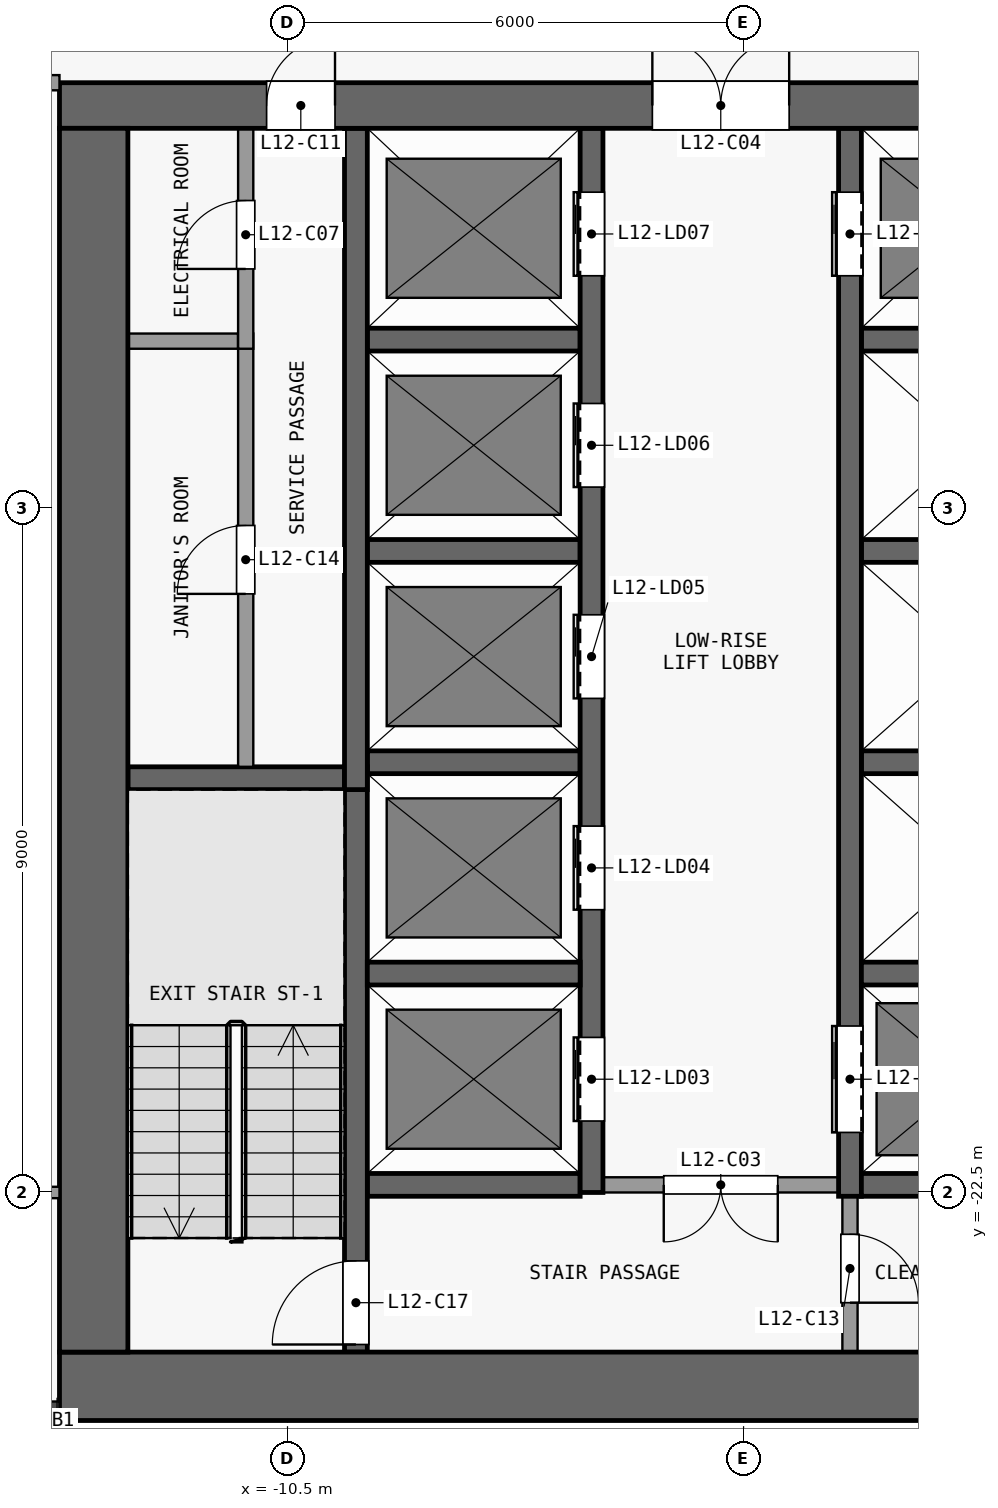
"""IFC4 building model, lengths in metres.
Left out: names, types, materials, properties, quantities, classifications, styles, units other than length and angle.
Written with IfcOpenShell. Run it as: python <this file> out.ifc"""

import sys

from ifc_helpers import new_model, si_unit, direction, frame, frame_2d, origin, place, context, subcontext, project, spatial, rectangle, extrude, element, fill, save


model = new_model("IFC4")
c1 = context("Model", 3, precision=1e-05, world=origin(), true_north=direction((0.0, 1.0)))
c2 = subcontext(c1, "Body", "Model", "MODEL_VIEW")
j1 = project(units=[si_unit("LENGTHUNIT", "METRE"), si_unit("PLANEANGLEUNIT", "RADIAN")], contexts=[c1])
p1 = place(None, origin())
s1 = spatial("IfcSite", under=j1, at=p1, CompositionType="ELEMENT")
p2 = place(p1, origin())
s2 = spatial("IfcBuilding", under=s1, at=p2, CompositionType="ELEMENT")
p3 = place(p2, frame((0.0, 0.0, 54.1)))
s3 = spatial("IfcBuildingStorey", under=s2, at=p3, CompositionType="ELEMENT", Elevation=54.1)
p4 = place(p3, frame((-13.5, -25.05, 0.0), z_axis=(0.0, 0.0, 1.0), x_axis=(1.0, 0.0, 0.0)))
e1 = element("IfcWall", 1, at=p4, inside=s3, PredefinedType="SHEAR", context=c2, shape_type="SweptSolid", body=[
    extrude(rectangle(XDim=27.0, YDim=0.9, at=frame_2d((13.5, 0.0))), origin(), (0.0, 0.0, 1.0), 3.3),
])
p5 = place(p3, frame((-13.5, -8.2, 0.0), z_axis=(0.0, 0.0, 1.0), x_axis=(1.0, 0.0, 0.0)))
e2 = element("IfcWall", 2, at=p5, inside=s3, PredefinedType="SHEAR", context=c2, shape_type="SweptSolid", body=[
    extrude(rectangle(XDim=27.0, YDim=0.6, at=frame_2d((13.5, 0.0))), origin(), (0.0, 0.0, 1.0), 3.3),
])
p6 = place(p5, frame((7.8, 0.0, 0.0)))
e3 = element("IfcOpeningElement", 3, at=p6, cuts=e2, PredefinedType="OPENING", context=c2, shape_type="SweptSolid", body=[
    extrude(rectangle(XDim=1.8, YDim=2.1, at=frame_2d((0.9, 1.05))), frame((0.0, 0.31, 0.0), z_axis=(0.0, -1.0, 0.0), x_axis=(1.0, 0.0, 0.0)), (0.0, 0.0, 1.0), 0.62),
])
p7 = place(p5, frame((17.4, 0.0, 0.0)))
e4 = element("IfcOpeningElement", 4, at=p7, cuts=e2, PredefinedType="OPENING", context=c2, shape_type="SweptSolid", body=[
    extrude(rectangle(XDim=1.8, YDim=2.1, at=frame_2d((0.9, 1.05))), frame((0.0, 0.31, 0.0), z_axis=(0.0, -1.0, 0.0), x_axis=(1.0, 0.0, 0.0)), (0.0, 0.0, 1.0), 0.62),
])
p8 = place(p5, frame((2.725, 0.0, 0.0)))
e5 = element("IfcOpeningElement", 5, at=p8, cuts=e2, PredefinedType="OPENING", context=c2, shape_type="SweptSolid", body=[
    extrude(rectangle(XDim=0.9, YDim=2.1, at=frame_2d((0.45, 1.05))), frame((0.0, 0.31, 0.0), z_axis=(0.0, -1.0, 0.0), x_axis=(1.0, 0.0, 0.0)), (0.0, 0.0, 1.0), 0.62),
])
p9 = place(p5, frame((23.375, 0.0, 0.0)))
e6 = element("IfcOpeningElement", 6, at=p9, cuts=e2, PredefinedType="OPENING", context=c2, shape_type="SweptSolid", body=[
    extrude(rectangle(XDim=0.9, YDim=2.1, at=frame_2d((0.45, 1.05))), frame((0.0, 0.31, 0.0), z_axis=(0.0, -1.0, 0.0), x_axis=(1.0, 0.0, 0.0)), (0.0, 0.0, 1.0), 0.62),
])
p10 = place(p3, frame((-13.05, -24.6, 0.0), z_axis=(0.0, 0.0, 1.0), x_axis=(0.0, 1.0, 0.0)))
e7 = element("IfcWall", 7, at=p10, inside=s3, PredefinedType="SHEAR", context=c2, shape_type="SweptSolid", body=[
    extrude(rectangle(XDim=16.1, YDim=0.9, at=frame_2d((8.05, 0.0))), origin(), (0.0, 0.0, 1.0), 3.3),
])
p11 = place(p3, frame((-9.45, -22.4, 0.0), z_axis=(0.0, 0.0, 1.0), x_axis=(1.0, 0.0, 0.0)))
e8 = element("IfcWall", 8, at=p11, inside=s3, PredefinedType="SHEAR", context=c2, shape_type="SweptSolid", body=[
    extrude(rectangle(XDim=2.8, YDim=0.3, at=frame_2d((1.4, 0.0))), origin(), (0.0, 0.0, 1.0), 3.3),
])
p12 = place(p3, frame((-3.25, -22.4, 0.0), z_axis=(0.0, 0.0, 1.0), x_axis=(-1.0, 0.0, 0.0)))
e9 = element("IfcWall", 9, at=p12, inside=s3, PredefinedType="PARTITIONING", context=c2, shape_type="SweptSolid", body=[
    extrude(rectangle(XDim=3.1, YDim=0.2, at=frame_2d((1.55, 0.0))), origin(), (0.0, 0.0, 1.0), 3.3),
])
p13 = place(p12, frame((0.8, 0.0, 0.0)))
e10 = element("IfcOpeningElement", 10, at=p13, cuts=e9, PredefinedType="OPENING", context=c2, shape_type="SweptSolid", body=[
    extrude(rectangle(XDim=1.5, YDim=2.1, at=frame_2d((0.75, 1.05))), frame((0.0, 0.11, 0.0), z_axis=(0.0, -1.0, 0.0), x_axis=(1.0, 0.0, 0.0)), (0.0, 0.0, 1.0), 0.22),
])
p14 = place(p3, frame((-2.95, -22.4, 0.0), z_axis=(0.0, 0.0, 1.0), x_axis=(1.0, 0.0, 0.0)))
e11 = element("IfcWall", 11, at=p14, inside=s3, PredefinedType="SHEAR", context=c2, shape_type="SweptSolid", body=[
    extrude(rectangle(XDim=6.2, YDim=0.3, at=frame_2d((3.1, 0.0))), origin(), (0.0, 0.0, 1.0), 3.3),
])
for number, where, z_axis, x_axis in (
    (12, (-9.45, -19.62, 0.0), (0.0, 0.0, 1.0), (1.0, 0.0, 0.0)),
    (13, (-2.95, -19.62, 0.0), (0.0, 0.0, 1.0), (1.0, 0.0, 0.0)),
):
    element("IfcWall", number, at=place(p3, frame(where, z_axis=z_axis, x_axis=x_axis)), inside=s3, PredefinedType="SHEAR", context=c2, shape_type="SweptSolid", body=[
        extrude(rectangle(XDim=2.8, YDim=0.3, at=frame_2d((1.4, 0.0))), origin(), (0.0, 0.0, 1.0), 3.3),
    ])
p15 = place(p3, frame((-12.6, -17.05, 0.0), z_axis=(0.0, 0.0, 1.0), x_axis=(1.0, 0.0, 0.0)))
e14 = element("IfcWall", 14, at=p15, inside=s3, PredefinedType="SHEAR", context=c2, shape_type="SweptSolid", body=[
    extrude(rectangle(XDim=2.85, YDim=0.3, at=frame_2d((1.425, 0.0))), origin(), (0.0, 0.0, 1.0), 3.3),
])
for number, where, z_axis, x_axis in (
    (15, (-9.45, -16.84, 0.0), (0.0, 0.0, 1.0), (1.0, 0.0, 0.0)),
    (16, (-2.95, -16.84, 0.0), (0.0, 0.0, 1.0), (1.0, 0.0, 0.0)),
    (17, (-9.45, -14.06, 0.0), (0.0, 0.0, 1.0), (1.0, 0.0, 0.0)),
    (18, (-2.95, -14.06, 0.0), (0.0, 0.0, 1.0), (1.0, 0.0, 0.0)),
):
    element("IfcWall", number, at=place(p3, frame(where, z_axis=z_axis, x_axis=x_axis)), inside=s3, PredefinedType="SHEAR", context=c2, shape_type="SweptSolid", body=[
        extrude(rectangle(XDim=2.8, YDim=0.3, at=frame_2d((1.4, 0.0))), origin(), (0.0, 0.0, 1.0), 3.3),
    ])
p16 = place(p3, frame((-12.6, -11.3, 0.0), z_axis=(0.0, 0.0, 1.0), x_axis=(1.0, 0.0, 0.0)))
e19 = element("IfcWall", 19, at=p16, inside=s3, PredefinedType="PARTITIONING", context=c2, shape_type="SweptSolid", body=[
    extrude(rectangle(XDim=1.45, YDim=0.2, at=frame_2d((0.725, 0.0))), origin(), (0.0, 0.0, 1.0), 3.3),
])
for number, where, z_axis, x_axis in (
    (20, (-9.45, -11.28, 0.0), (0.0, 0.0, 1.0), (1.0, 0.0, 0.0)),
    (21, (-2.95, -11.28, 0.0), (0.0, 0.0, 1.0), (1.0, 0.0, 0.0)),
):
    element("IfcWall", number, at=place(p3, frame(where, z_axis=z_axis, x_axis=x_axis)), inside=s3, PredefinedType="SHEAR", context=c2, shape_type="SweptSolid", body=[
        extrude(rectangle(XDim=2.8, YDim=0.3, at=frame_2d((1.4, 0.0))), origin(), (0.0, 0.0, 1.0), 3.3),
    ])
p17 = place(p3, frame((-11.05, -16.9, 0.0), z_axis=(0.0, 0.0, 1.0), x_axis=(0.0, 1.0, 0.0)))
e22 = element("IfcWall", 22, at=p17, inside=s3, PredefinedType="PARTITIONING", context=c2, shape_type="SweptSolid", body=[
    extrude(rectangle(XDim=5.7, YDim=0.2, at=frame_2d((2.85, 0.0))), origin(), (0.0, 0.0, 1.0), 3.3),
])
p18 = place(p17, frame((2.275, 0.0, 0.0)))
e23 = element("IfcOpeningElement", 23, at=p18, cuts=e22, PredefinedType="OPENING", context=c2, shape_type="SweptSolid", body=[
    extrude(rectangle(XDim=0.9, YDim=2.1, at=frame_2d((0.45, 1.05))), frame((0.0, 0.11, 0.0), z_axis=(0.0, -1.0, 0.0), x_axis=(1.0, 0.0, 0.0)), (0.0, 0.0, 1.0), 0.22),
])
p19 = place(p3, frame((-11.05, -11.4, 0.0), z_axis=(0.0, 0.0, 1.0), x_axis=(0.0, 1.0, 0.0)))
e24 = element("IfcWall", 24, at=p19, inside=s3, PredefinedType="PARTITIONING", context=c2, shape_type="SweptSolid", body=[
    extrude(rectangle(XDim=2.9, YDim=0.2, at=frame_2d((1.45, 0.0))), origin(), (0.0, 0.0, 1.0), 3.3),
])
p20 = place(p19, frame((1.05, 0.0, 0.0)))
e25 = element("IfcOpeningElement", 25, at=p20, cuts=e24, PredefinedType="OPENING", context=c2, shape_type="SweptSolid", body=[
    extrude(rectangle(XDim=0.9, YDim=2.1, at=frame_2d((0.45, 1.05))), frame((0.0, 0.11, 0.0), z_axis=(0.0, -1.0, 0.0), x_axis=(1.0, 0.0, 0.0)), (0.0, 0.0, 1.0), 0.22),
])
p21 = place(p3, frame((-9.6, -24.6, 0.0), z_axis=(0.0, 0.0, 1.0), x_axis=(0.0, 1.0, 0.0)))
e26 = element("IfcWall", 26, at=p21, inside=s3, PredefinedType="SHEAR", context=c2, shape_type="SweptSolid", body=[
    extrude(rectangle(XDim=7.7, YDim=0.3, at=frame_2d((3.85, 0.0))), origin(), (0.0, 0.0, 1.0), 3.3),
])
p22 = place(p21, frame((0.1, 0.0, 0.0)))
e27 = element("IfcOpeningElement", 27, at=p22, cuts=e26, PredefinedType="OPENING", context=c2, shape_type="SweptSolid", body=[
    extrude(rectangle(XDim=1.1, YDim=2.1, at=frame_2d((0.55, 1.05))), frame((0.0, 0.16, 0.0), z_axis=(0.0, -1.0, 0.0), x_axis=(1.0, 0.0, 0.0)), (0.0, 0.0, 1.0), 0.32),
])
p23 = place(p3, frame((-9.6, -17.2, 0.0), z_axis=(0.0, 0.0, 1.0), x_axis=(0.0, 1.0, 0.0)))
e28 = element("IfcWall", 28, at=p23, inside=s3, PredefinedType="SHEAR", context=c2, shape_type="SweptSolid", body=[
    extrude(rectangle(XDim=8.7, YDim=0.3, at=frame_2d((4.35, 0.0))), origin(), (0.0, 0.0, 1.0), 3.3),
])
p24 = place(p3, frame((-6.5, -22.5, 0.0), z_axis=(0.0, 0.0, 1.0), x_axis=(0.0, 1.0, 0.0)))
e29 = element("IfcWall", 29, at=p24, inside=s3, PredefinedType="SHEAR", context=c2, shape_type="SweptSolid", body=[
    extrude(rectangle(XDim=14.0, YDim=0.3, at=frame_2d((7.0, 0.0))), origin(), (0.0, 0.0, 1.0), 3.3),
])
p25 = place(p24, frame((0.94, 0.0, 0.0)))
e30 = element("IfcOpeningElement", 30, at=p25, cuts=e29, PredefinedType="OPENING", context=c2, shape_type="SweptSolid", body=[
    extrude(rectangle(XDim=1.1, YDim=2.1, at=frame_2d((0.55, 1.05))), frame((0.0, 0.16, 0.0), z_axis=(0.0, -1.0, 0.0), x_axis=(1.0, 0.0, 0.0)), (0.0, 0.0, 1.0), 0.32),
])
p26 = place(p24, frame((3.72, 0.0, 0.0)))
e31 = element("IfcOpeningElement", 31, at=p26, cuts=e29, PredefinedType="OPENING", context=c2, shape_type="SweptSolid", body=[
    extrude(rectangle(XDim=1.1, YDim=2.1, at=frame_2d((0.55, 1.05))), frame((0.0, 0.16, 0.0), z_axis=(0.0, -1.0, 0.0), x_axis=(1.0, 0.0, 0.0)), (0.0, 0.0, 1.0), 0.32),
])
p27 = place(p24, frame((6.5, 0.0, 0.0)))
e32 = element("IfcOpeningElement", 32, at=p27, cuts=e29, PredefinedType="OPENING", context=c2, shape_type="SweptSolid", body=[
    extrude(rectangle(XDim=1.1, YDim=2.1, at=frame_2d((0.55, 1.05))), frame((0.0, 0.16, 0.0), z_axis=(0.0, -1.0, 0.0), x_axis=(1.0, 0.0, 0.0)), (0.0, 0.0, 1.0), 0.32),
])
p28 = place(p24, frame((9.28, 0.0, 0.0)))
e33 = element("IfcOpeningElement", 33, at=p28, cuts=e29, PredefinedType="OPENING", context=c2, shape_type="SweptSolid", body=[
    extrude(rectangle(XDim=1.1, YDim=2.1, at=frame_2d((0.55, 1.05))), frame((0.0, 0.16, 0.0), z_axis=(0.0, -1.0, 0.0), x_axis=(1.0, 0.0, 0.0)), (0.0, 0.0, 1.0), 0.32),
])
p29 = place(p24, frame((12.06, 0.0, 0.0)))
e34 = element("IfcOpeningElement", 34, at=p29, cuts=e29, PredefinedType="OPENING", context=c2, shape_type="SweptSolid", body=[
    extrude(rectangle(XDim=1.1, YDim=2.1, at=frame_2d((0.55, 1.05))), frame((0.0, 0.16, 0.0), z_axis=(0.0, -1.0, 0.0), x_axis=(1.0, 0.0, 0.0)), (0.0, 0.0, 1.0), 0.32),
])
p30 = place(p3, frame((-3.1, -22.55, 0.0), z_axis=(0.0, 0.0, 1.0), x_axis=(0.0, -1.0, 0.0)))
e35 = element("IfcWall", 35, at=p30, inside=s3, PredefinedType="PARTITIONING", context=c2, shape_type="SweptSolid", body=[
    extrude(rectangle(XDim=2.05, YDim=0.2, at=frame_2d((1.025, 0.0))), origin(), (0.0, 0.0, 1.0), 3.3),
])
p31 = place(p30, frame((0.5, 0.0, 0.0)))
e36 = element("IfcOpeningElement", 36, at=p31, cuts=e35, PredefinedType="OPENING", context=c2, shape_type="SweptSolid", body=[
    extrude(rectangle(XDim=0.9, YDim=2.1, at=frame_2d((0.45, 1.05))), frame((0.0, 0.11, 0.0), z_axis=(0.0, -1.0, 0.0), x_axis=(1.0, 0.0, 0.0)), (0.0, 0.0, 1.0), 0.22),
])
p32 = place(p3, frame((-3.1, -22.55, 0.0), z_axis=(0.0, 0.0, 1.0), x_axis=(0.0, 1.0, 0.0)))
e37 = element("IfcWall", 37, at=p32, inside=s3, PredefinedType="SHEAR", context=c2, shape_type="SweptSolid", body=[
    extrude(rectangle(XDim=14.05, YDim=0.3, at=frame_2d((7.025, 0.0))), origin(), (0.0, 0.0, 1.0), 3.3),
])
p33 = place(p32, frame((12.11, 0.0, 0.0)))
e38 = element("IfcOpeningElement", 38, at=p33, cuts=e37, PredefinedType="OPENING", context=c2, shape_type="SweptSolid", body=[
    extrude(rectangle(XDim=1.1, YDim=2.1, at=frame_2d((0.55, 1.05))), frame((0.0, 0.16, 0.0), z_axis=(0.0, -1.0, 0.0), x_axis=(1.0, 0.0, 0.0)), (0.0, 0.0, 1.0), 0.32),
])
p34 = place(p32, frame((0.84, 0.0, 0.0)))
e39 = element("IfcOpeningElement", 39, at=p34, cuts=e37, PredefinedType="OPENING", context=c2, shape_type="SweptSolid", body=[
    extrude(rectangle(XDim=1.4, YDim=2.1, at=frame_2d((0.7, 1.05))), frame((0.0, 0.16, 0.0), z_axis=(0.0, -1.0, 0.0), x_axis=(1.0, 0.0, 0.0)), (0.0, 0.0, 1.0), 0.32),
])
p35 = place(p3, frame((-16.425, -22.5, 0.0), z_axis=(0.0, 0.0, 1.0), x_axis=(1.0, 0.0, 0.0)))
e40 = element("IfcWall", 40, at=p35, inside=s3, PredefinedType="PARTITIONING", context=c2, shape_type="SweptSolid", body=[
    extrude(rectangle(XDim=2.925, YDim=0.15, at=frame_2d((1.462, 0.0))), origin(), (0.0, 0.0, 1.0), 3.3),
])
p36 = place(p35, frame((1.0, 0.0, 0.0)))
e41 = element("IfcOpeningElement", 41, at=p36, cuts=e40, PredefinedType="OPENING", context=c2, shape_type="SweptSolid", body=[
    extrude(rectangle(XDim=0.9, YDim=2.1, at=frame_2d((0.45, 1.05))), frame((0.0, 0.085, 0.0), z_axis=(0.0, -1.0, 0.0), x_axis=(1.0, 0.0, 0.0)), (0.0, 0.0, 1.0), 0.17),
])
p37 = place(p3, frame((-25.25, -7.9, 0.0), z_axis=(0.0, 0.0, 1.0), x_axis=(1.0, 0.0, 0.0)))
e42 = element("IfcWall", 42, at=p37, inside=s3, PredefinedType="PARTITIONING", context=c2, shape_type="SweptSolid", body=[
    extrude(rectangle(XDim=11.75, YDim=0.2, at=frame_2d((5.875, 0.0))), origin(), (0.0, 0.0, 1.0), 3.3),
])
p38 = place(p37, frame((9.75, 0.0, 0.0)))
e43 = element("IfcOpeningElement", 43, at=p38, cuts=e42, PredefinedType="OPENING", context=c2, shape_type="SweptSolid", body=[
    extrude(rectangle(XDim=1.0, YDim=2.1, at=frame_2d((0.5, 1.05))), frame((0.0, 0.11, 0.0), z_axis=(0.0, -1.0, 0.0), x_axis=(1.0, 0.0, 0.0)), (0.0, 0.0, 1.0), 0.22),
])
p39 = place(p25, origin())
e44 = element("IfcDoor", 44, at=p39, inside=s3, OperationType="DOUBLE_DOOR_SLIDING", PredefinedType="DOOR", context=c2, shape_type="SweptSolid", body=[
    extrude(rectangle(XDim=1.1, YDim=2.1, at=frame_2d((0.55, 1.05))), frame((0.0, 0.025, 0.0), z_axis=(0.0, -1.0, 0.0), x_axis=(1.0, 0.0, 0.0)), (0.0, 0.0, 1.0), 0.05),
])
fill(e30, e44)
p40 = place(p26, origin())
e45 = element("IfcDoor", 45, at=p40, inside=s3, OperationType="DOUBLE_DOOR_SLIDING", PredefinedType="DOOR", context=c2, shape_type="SweptSolid", body=[
    extrude(rectangle(XDim=1.1, YDim=2.1, at=frame_2d((0.55, 1.05))), frame((0.0, 0.025, 0.0), z_axis=(0.0, -1.0, 0.0), x_axis=(1.0, 0.0, 0.0)), (0.0, 0.0, 1.0), 0.05),
])
fill(e31, e45)
p41 = place(p27, origin())
e46 = element("IfcDoor", 46, at=p41, inside=s3, OperationType="DOUBLE_DOOR_SLIDING", PredefinedType="DOOR", context=c2, shape_type="SweptSolid", body=[
    extrude(rectangle(XDim=1.1, YDim=2.1, at=frame_2d((0.55, 1.05))), frame((0.0, 0.025, 0.0), z_axis=(0.0, -1.0, 0.0), x_axis=(1.0, 0.0, 0.0)), (0.0, 0.0, 1.0), 0.05),
])
fill(e32, e46)
p42 = place(p28, origin())
e47 = element("IfcDoor", 47, at=p42, inside=s3, OperationType="DOUBLE_DOOR_SLIDING", PredefinedType="DOOR", context=c2, shape_type="SweptSolid", body=[
    extrude(rectangle(XDim=1.1, YDim=2.1, at=frame_2d((0.55, 1.05))), frame((0.0, 0.025, 0.0), z_axis=(0.0, -1.0, 0.0), x_axis=(1.0, 0.0, 0.0)), (0.0, 0.0, 1.0), 0.05),
])
fill(e33, e47)
p43 = place(p29, origin())
e48 = element("IfcDoor", 48, at=p43, inside=s3, OperationType="DOUBLE_DOOR_SLIDING", PredefinedType="DOOR", context=c2, shape_type="SweptSolid", body=[
    extrude(rectangle(XDim=1.1, YDim=2.1, at=frame_2d((0.55, 1.05))), frame((0.0, 0.025, 0.0), z_axis=(0.0, -1.0, 0.0), x_axis=(1.0, 0.0, 0.0)), (0.0, 0.0, 1.0), 0.05),
])
fill(e34, e48)
p44 = place(p33, origin())
e49 = element("IfcDoor", 49, at=p44, inside=s3, OperationType="DOUBLE_DOOR_SLIDING", PredefinedType="DOOR", context=c2, shape_type="SweptSolid", body=[
    extrude(rectangle(XDim=1.1, YDim=2.1, at=frame_2d((0.55, 1.05))), frame((0.0, 0.025, 0.0), z_axis=(0.0, -1.0, 0.0), x_axis=(1.0, 0.0, 0.0)), (0.0, 0.0, 1.0), 0.05),
])
fill(e38, e49)
p45 = place(p34, origin())
e50 = element("IfcDoor", 50, at=p45, inside=s3, OperationType="DOUBLE_DOOR_SLIDING", PredefinedType="DOOR", context=c2, shape_type="SweptSolid", body=[
    extrude(rectangle(XDim=1.4, YDim=2.1, at=frame_2d((0.7, 1.05))), frame((0.0, 0.025, 0.0), z_axis=(0.0, -1.0, 0.0), x_axis=(1.0, 0.0, 0.0)), (0.0, 0.0, 1.0), 0.05),
])
fill(e39, e50)
p46 = place(p13, origin())
e51 = element("IfcDoor", 51, at=p46, inside=s3, OperationType="DOUBLE_DOOR_SINGLE_SWING", PredefinedType="DOOR", context=c2, shape_type="SweptSolid", body=[
    extrude(rectangle(XDim=1.5, YDim=2.1, at=frame_2d((0.75, 1.05))), frame((0.0, 0.025, 0.0), z_axis=(0.0, -1.0, 0.0), x_axis=(1.0, 0.0, 0.0)), (0.0, 0.0, 1.0), 0.05),
])
fill(e10, e51)
p47 = place(p6, origin())
e52 = element("IfcDoor", 52, at=p47, inside=s3, OperationType="DOUBLE_DOOR_SINGLE_SWING", PredefinedType="DOOR", context=c2, shape_type="SweptSolid", body=[
    extrude(rectangle(XDim=1.8, YDim=2.1, at=frame_2d((0.9, 1.05))), frame((0.0, 0.025, 0.0), z_axis=(0.0, -1.0, 0.0), x_axis=(1.0, 0.0, 0.0)), (0.0, 0.0, 1.0), 0.05),
])
fill(e3, e52)
p48 = place(p20, origin())
e53 = element("IfcDoor", 53, at=p48, inside=s3, OperationType="SINGLE_SWING_LEFT", PredefinedType="DOOR", context=c2, shape_type="SweptSolid", body=[
    extrude(rectangle(XDim=0.9, YDim=2.1, at=frame_2d((0.45, 1.05))), frame((0.0, 0.025, 0.0), z_axis=(0.0, -1.0, 0.0), x_axis=(1.0, 0.0, 0.0)), (0.0, 0.0, 1.0), 0.05),
])
fill(e25, e53)
p49 = place(p8, origin())
e54 = element("IfcDoor", 54, at=p49, inside=s3, OperationType="SINGLE_SWING_RIGHT", PredefinedType="DOOR", context=c2, shape_type="SweptSolid", body=[
    extrude(rectangle(XDim=0.9, YDim=2.1, at=frame_2d((0.45, 1.05))), frame((0.0, 0.025, 0.0), z_axis=(0.0, -1.0, 0.0), x_axis=(1.0, 0.0, 0.0)), (0.0, 0.0, 1.0), 0.05),
])
fill(e5, e54)
p50 = place(p31, origin())
e55 = element("IfcDoor", 55, at=p50, inside=s3, OperationType="SINGLE_SWING_RIGHT", PredefinedType="DOOR", context=c2, shape_type="SweptSolid", body=[
    extrude(rectangle(XDim=0.9, YDim=2.1, at=frame_2d((0.45, 1.05))), frame((0.0, 0.025, 0.0), z_axis=(0.0, -1.0, 0.0), x_axis=(1.0, 0.0, 0.0)), (0.0, 0.0, 1.0), 0.05),
])
fill(e36, e55)
p51 = place(p18, origin())
e56 = element("IfcDoor", 56, at=p51, inside=s3, OperationType="SINGLE_SWING_LEFT", PredefinedType="DOOR", context=c2, shape_type="SweptSolid", body=[
    extrude(rectangle(XDim=0.9, YDim=2.1, at=frame_2d((0.45, 1.05))), frame((0.0, 0.025, 0.0), z_axis=(0.0, -1.0, 0.0), x_axis=(1.0, 0.0, 0.0)), (0.0, 0.0, 1.0), 0.05),
])
fill(e23, e56)
p52 = place(p22, origin())
e57 = element("IfcDoor", 57, at=p52, inside=s3, OperationType="SINGLE_SWING_LEFT", PredefinedType="DOOR", context=c2, shape_type="SweptSolid", body=[
    extrude(rectangle(XDim=1.1, YDim=2.1, at=frame_2d((0.55, 1.05))), frame((0.0, 0.025, 0.0), z_axis=(0.0, -1.0, 0.0), x_axis=(1.0, 0.0, 0.0)), (0.0, 0.0, 1.0), 0.05),
])
fill(e27, e57)
save(model, sys.argv[1])
